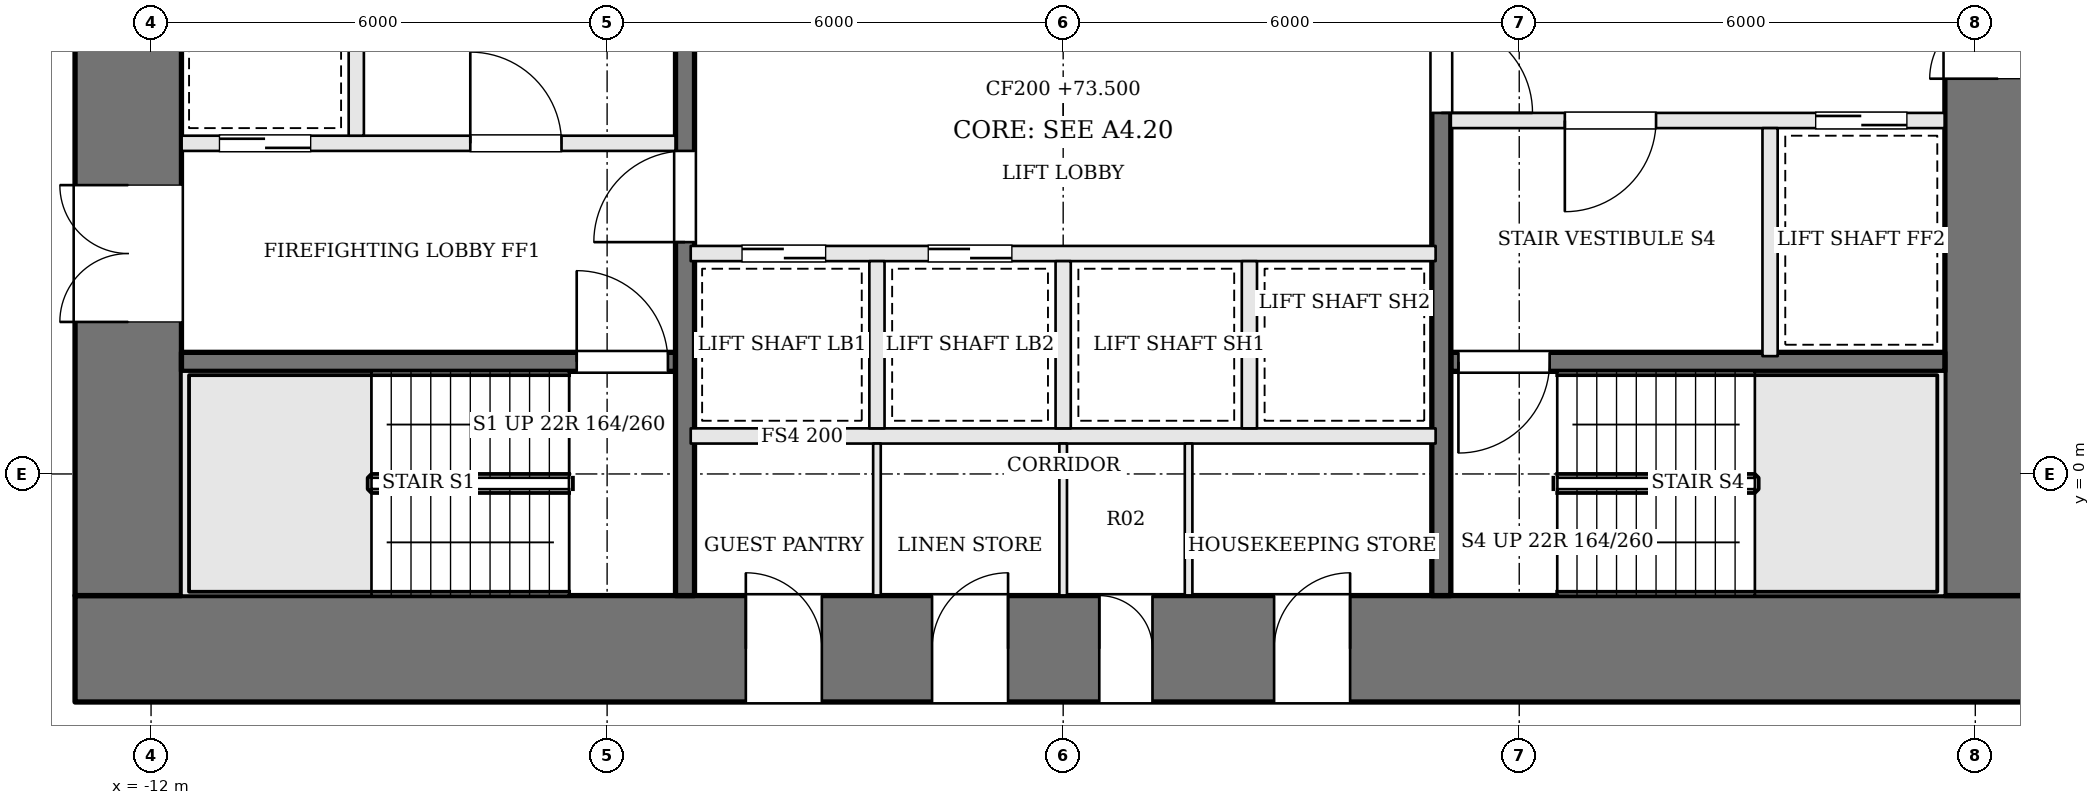
"""IFC4 building model, lengths in metres.
Left out: names, types, materials, properties, quantities, classifications, styles, units other than length and angle.
Written with IfcOpenShell. Run it as: python <this file> out.ifc"""

import sys

from ifc_helpers import new_model, si_unit, direction, frame, frame_2d, origin, place, context, subcontext, project, spatial, rectangle, extrude, element, fill, save


model = new_model("IFC4")
c1 = context("Model", 3, precision=1e-05, world=origin(), true_north=direction((0.0, 1.0)))
c2 = subcontext(c1, "Body", "Model", "MODEL_VIEW")
j1 = project(units=[si_unit("LENGTHUNIT", "METRE"), si_unit("PLANEANGLEUNIT", "RADIAN")], contexts=[c1])
p1 = place(None, origin())
s1 = spatial("IfcSite", under=j1, at=p1, CompositionType="ELEMENT")
p2 = place(p1, origin())
s2 = spatial("IfcBuilding", under=s1, at=p2, CompositionType="ELEMENT")
p3 = place(p2, frame((0.0, 0.0, 73.5)))
s3 = spatial("IfcBuildingStorey", under=s2, at=p3, CompositionType="ELEMENT", Elevation=73.5)
p4 = place(p3, frame((-13.0, -2.3, 0.0), z_axis=(0.0, 0.0, 1.0), x_axis=(1.0, 0.0, 0.0)))
e1 = element("IfcWall", 1, at=p4, inside=s3, PredefinedType="SHEAR", context=c2, shape_type="SweptSolid", body=[
    extrude(rectangle(XDim=26.0, YDim=1.4, at=frame_2d((13.0, 0.0))), origin(), (0.0, 0.0, 1.0), 3.6),
])
p5 = place(p4, frame((8.825, 0.0, 0.0)))
e2 = element("IfcOpeningElement", 2, at=p5, cuts=e1, PredefinedType="OPENING", context=c2, shape_type="SweptSolid", body=[
    extrude(rectangle(XDim=1.0, YDim=2.1, at=frame_2d((0.5, 1.05))), frame((0.0, 0.71, 0.0), z_axis=(0.0, -1.0, 0.0), x_axis=(1.0, 0.0, 0.0)), (0.0, 0.0, 1.0), 1.42),
])
p6 = place(p4, frame((11.275, 0.0, 0.0)))
e3 = element("IfcOpeningElement", 3, at=p6, cuts=e1, PredefinedType="OPENING", context=c2, shape_type="SweptSolid", body=[
    extrude(rectangle(XDim=1.0, YDim=2.1, at=frame_2d((0.5, 1.05))), frame((0.0, 0.71, 0.0), z_axis=(0.0, -1.0, 0.0), x_axis=(1.0, 0.0, 0.0)), (0.0, 0.0, 1.0), 1.42),
])
p7 = place(p4, frame((13.475, 0.0, 0.0)))
e4 = element("IfcOpeningElement", 4, at=p7, cuts=e1, PredefinedType="OPENING", context=c2, shape_type="SweptSolid", body=[
    extrude(rectangle(XDim=0.7, YDim=2.1, at=frame_2d((0.35, 1.05))), frame((0.0, 0.71, 0.0), z_axis=(0.0, -1.0, 0.0), x_axis=(1.0, 0.0, 0.0)), (0.0, 0.0, 1.0), 1.42),
])
p8 = place(p4, frame((15.775, 0.0, 0.0)))
e5 = element("IfcOpeningElement", 5, at=p8, cuts=e1, PredefinedType="OPENING", context=c2, shape_type="SweptSolid", body=[
    extrude(rectangle(XDim=1.0, YDim=2.1, at=frame_2d((0.5, 1.05))), frame((0.0, 0.71, 0.0), z_axis=(0.0, -1.0, 0.0), x_axis=(1.0, 0.0, 0.0)), (0.0, 0.0, 1.0), 1.42),
])
p9 = place(p3, frame((12.3, -1.6, 0.0), z_axis=(0.0, 0.0, 1.0), x_axis=(0.0, 1.0, 0.0)))
e6 = element("IfcWall", 6, at=p9, inside=s3, PredefinedType="SHEAR", context=c2, shape_type="SweptSolid", body=[
    extrude(rectangle(XDim=12.2, YDim=1.4, at=frame_2d((6.1, 0.0))), origin(), (0.0, 0.0, 1.0), 3.6),
])
p10 = place(p9, frame((6.8, 0.0, 0.0)))
e7 = element("IfcOpeningElement", 7, at=p10, cuts=e6, PredefinedType="OPENING", context=c2, shape_type="SweptSolid", body=[
    extrude(rectangle(XDim=1.8, YDim=2.1, at=frame_2d((0.9, 1.05))), frame((0.0, 0.71, 0.0), z_axis=(0.0, -1.0, 0.0), x_axis=(1.0, 0.0, 0.0)), (0.0, 0.0, 1.0), 1.42),
])
p11 = place(p3, frame((-12.3, -1.6, 0.0), z_axis=(0.0, 0.0, 1.0), x_axis=(0.0, 1.0, 0.0)))
e8 = element("IfcWall", 8, at=p11, inside=s3, PredefinedType="SHEAR", context=c2, shape_type="SweptSolid", body=[
    extrude(rectangle(XDim=12.2, YDim=1.4, at=frame_2d((6.1, 0.0))), origin(), (0.0, 0.0, 1.0), 3.6),
])
p12 = place(p11, frame((3.6, 0.0, 0.0)))
e9 = element("IfcOpeningElement", 9, at=p12, cuts=e8, PredefinedType="OPENING", context=c2, shape_type="SweptSolid", body=[
    extrude(rectangle(XDim=1.8, YDim=2.1, at=frame_2d((0.9, 1.05))), frame((0.0, 0.71, 0.0), z_axis=(0.0, -1.0, 0.0), x_axis=(1.0, 0.0, 0.0)), (0.0, 0.0, 1.0), 1.42),
])
p13 = place(p3, frame((-11.6, 1.475, 0.0), z_axis=(0.0, 0.0, 1.0), x_axis=(1.0, 0.0, 0.0)))
e10 = element("IfcWall", 10, at=p13, inside=s3, PredefinedType="SOLIDWALL", context=c2, shape_type="SweptSolid", body=[
    extrude(rectangle(XDim=6.5, YDim=0.25, at=frame_2d((3.25, 0.0))), origin(), (0.0, 0.0, 1.0), 3.3),
])
p14 = place(p13, frame((5.2, 0.0, 0.0)))
e11 = element("IfcOpeningElement", 11, at=p14, cuts=e10, PredefinedType="OPENING", context=c2, shape_type="SweptSolid", body=[
    extrude(rectangle(XDim=1.2, YDim=2.1, at=frame_2d((0.6, 1.05))), frame((0.0, 0.135, 0.0), z_axis=(0.0, -1.0, 0.0), x_axis=(1.0, 0.0, 0.0)), (0.0, 0.0, 1.0), 0.27),
])
p15 = place(p3, frame((-11.6, 4.35, 0.0), z_axis=(0.0, 0.0, 1.0), x_axis=(1.0, 0.0, 0.0)))
e12 = element("IfcWall", 12, at=p15, inside=s3, PredefinedType="SOLIDWALL", context=c2, shape_type="SweptSolid", body=[
    extrude(rectangle(XDim=6.5, YDim=0.2, at=frame_2d((3.25, 0.0))), origin(), (0.0, 0.0, 1.0), 3.3),
])
p16 = place(p15, frame((3.8, 0.0, 0.0)))
e13 = element("IfcOpeningElement", 13, at=p16, cuts=e12, PredefinedType="OPENING", context=c2, shape_type="SweptSolid", body=[
    extrude(rectangle(XDim=1.2, YDim=2.1, at=frame_2d((0.6, 1.05))), frame((0.0, 0.11, 0.0), z_axis=(0.0, -1.0, 0.0), x_axis=(1.0, 0.0, 0.0)), (0.0, 0.0, 1.0), 0.22),
])
p17 = place(p15, frame((0.5, 0.0, 0.0)))
e14 = element("IfcOpeningElement", 14, at=p17, cuts=e12, PredefinedType="OPENING", context=c2, shape_type="SweptSolid", body=[
    extrude(rectangle(XDim=1.2, YDim=2.1, at=frame_2d((0.6, 1.05))), frame((0.0, 0.11, 0.0), z_axis=(0.0, -1.0, 0.0), x_axis=(1.0, 0.0, 0.0)), (0.0, 0.0, 1.0), 0.22),
])
p18 = place(p3, frame((11.6, 4.65, 0.0), z_axis=(0.0, 0.0, 1.0), x_axis=(-1.0, 0.0, 0.0)))
e15 = element("IfcWall", 15, at=p18, inside=s3, PredefinedType="SOLIDWALL", context=c2, shape_type="SweptSolid", body=[
    extrude(rectangle(XDim=6.5, YDim=0.2, at=frame_2d((3.25, 0.0))), origin(), (0.0, 0.0, 1.0), 3.3),
])
p19 = place(p18, frame((3.8, 0.0, 0.0)))
e16 = element("IfcOpeningElement", 16, at=p19, cuts=e15, PredefinedType="OPENING", context=c2, shape_type="SweptSolid", body=[
    extrude(rectangle(XDim=1.2, YDim=2.1, at=frame_2d((0.6, 1.05))), frame((0.0, 0.11, 0.0), z_axis=(0.0, -1.0, 0.0), x_axis=(1.0, 0.0, 0.0)), (0.0, 0.0, 1.0), 0.22),
])
p20 = place(p18, frame((0.5, 0.0, 0.0)))
e17 = element("IfcOpeningElement", 17, at=p20, cuts=e15, PredefinedType="OPENING", context=c2, shape_type="SweptSolid", body=[
    extrude(rectangle(XDim=1.2, YDim=2.1, at=frame_2d((0.6, 1.05))), frame((0.0, 0.11, 0.0), z_axis=(0.0, -1.0, 0.0), x_axis=(1.0, 0.0, 0.0)), (0.0, 0.0, 1.0), 0.22),
])
p21 = place(p3, frame((11.6, 1.475, 0.0), z_axis=(0.0, 0.0, 1.0), x_axis=(-1.0, 0.0, 0.0)))
e18 = element("IfcWall", 18, at=p21, inside=s3, PredefinedType="SOLIDWALL", context=c2, shape_type="SweptSolid", body=[
    extrude(rectangle(XDim=6.5, YDim=0.25, at=frame_2d((3.25, 0.0))), origin(), (0.0, 0.0, 1.0), 3.3),
])
p22 = place(p21, frame((5.2, 0.0, 0.0)))
e19 = element("IfcOpeningElement", 19, at=p22, cuts=e18, PredefinedType="OPENING", context=c2, shape_type="SweptSolid", body=[
    extrude(rectangle(XDim=1.2, YDim=2.1, at=frame_2d((0.6, 1.05))), frame((0.0, 0.135, 0.0), z_axis=(0.0, -1.0, 0.0), x_axis=(1.0, 0.0, 0.0)), (0.0, 0.0, 1.0), 0.27),
])
for number, where, z_axis, x_axis in (
    (20, (-9.3, 4.45, 0.0), (0.0, 0.0, 1.0), (0.0, 1.0, 0.0)),
    (21, (9.3, 4.55, 0.0), (0.0, 0.0, 1.0), (0.0, -1.0, 0.0)),
):
    element("IfcWall", number, at=place(p3, frame(where, z_axis=z_axis, x_axis=x_axis)), inside=s3, PredefinedType="SOLIDWALL", context=c2, shape_type="SweptSolid", body=[
        extrude(rectangle(XDim=3.0, YDim=0.2, at=frame_2d((1.5, 0.0))), origin(), (0.0, 0.0, 1.0), 3.3),
    ])
p23 = place(p3, frame((-4.975, -1.6, 0.0), z_axis=(0.0, 0.0, 1.0), x_axis=(0.0, 1.0, 0.0)))
e22 = element("IfcWall", 22, at=p23, inside=s3, PredefinedType="SOLIDWALL", context=c2, shape_type="SweptSolid", body=[
    extrude(rectangle(XDim=12.2, YDim=0.25, at=frame_2d((6.1, 0.0))), origin(), (0.0, 0.0, 1.0), 3.3),
])
p24 = place(p23, frame((4.65, 0.0, 0.0)))
e23 = element("IfcOpeningElement", 23, at=p24, cuts=e22, PredefinedType="OPENING", context=c2, shape_type="SweptSolid", body=[
    extrude(rectangle(XDim=1.2, YDim=2.1, at=frame_2d((0.6, 1.05))), frame((0.0, 0.135, 0.0), z_axis=(0.0, -1.0, 0.0), x_axis=(1.0, 0.0, 0.0)), (0.0, 0.0, 1.0), 0.27),
])
p25 = place(p3, frame((4.975, 10.6, 0.0), z_axis=(0.0, 0.0, 1.0), x_axis=(0.0, -1.0, 0.0)))
e24 = element("IfcWall", 24, at=p25, inside=s3, PredefinedType="SOLIDWALL", context=c2, shape_type="SweptSolid", body=[
    extrude(rectangle(XDim=12.2, YDim=0.25, at=frame_2d((6.1, 0.0))), origin(), (0.0, 0.0, 1.0), 3.3),
])
p26 = place(p25, frame((4.65, 0.0, 0.0)))
e25 = element("IfcOpeningElement", 25, at=p26, cuts=e24, PredefinedType="OPENING", context=c2, shape_type="SweptSolid", body=[
    extrude(rectangle(XDim=1.2, YDim=2.1, at=frame_2d((0.6, 1.05))), frame((0.0, 0.135, 0.0), z_axis=(0.0, -1.0, 0.0), x_axis=(1.0, 0.0, 0.0)), (0.0, 0.0, 1.0), 0.27),
])
p27 = place(p3, frame((-4.9, 0.5, 0.0), z_axis=(0.0, 0.0, 1.0), x_axis=(1.0, 0.0, 0.0)))
e26 = element("IfcWall", 26, at=p27, inside=s3, PredefinedType="SOLIDWALL", context=c2, shape_type="SweptSolid", body=[
    extrude(rectangle(XDim=9.8, YDim=0.2, at=frame_2d((4.9, 0.0))), origin(), (0.0, 0.0, 1.0), 3.3),
])
p28 = place(p3, frame((-4.9, 2.9, 0.0), z_axis=(0.0, 0.0, 1.0), x_axis=(1.0, 0.0, 0.0)))
e27 = element("IfcWall", 27, at=p28, inside=s3, PredefinedType="SOLIDWALL", context=c2, shape_type="SweptSolid", body=[
    extrude(rectangle(XDim=9.8, YDim=0.2, at=frame_2d((4.9, 0.0))), origin(), (0.0, 0.0, 1.0), 3.3),
])
p29 = place(p28, frame((0.675, 0.0, 0.0)))
e28 = element("IfcOpeningElement", 28, at=p29, cuts=e27, PredefinedType="OPENING", context=c2, shape_type="SweptSolid", body=[
    extrude(rectangle(XDim=1.1, YDim=2.1, at=frame_2d((0.55, 1.05))), frame((0.0, 0.11, 0.0), z_axis=(0.0, -1.0, 0.0), x_axis=(1.0, 0.0, 0.0)), (0.0, 0.0, 1.0), 0.22),
])
p30 = place(p28, frame((3.125, 0.0, 0.0)))
e29 = element("IfcOpeningElement", 29, at=p30, cuts=e27, PredefinedType="OPENING", context=c2, shape_type="SweptSolid", body=[
    extrude(rectangle(XDim=1.1, YDim=2.1, at=frame_2d((0.55, 1.05))), frame((0.0, 0.11, 0.0), z_axis=(0.0, -1.0, 0.0), x_axis=(1.0, 0.0, 0.0)), (0.0, 0.0, 1.0), 0.22),
])
for number, where, z_axis, x_axis in (
    (30, (-2.45, 0.6, 0.0), (0.0, 0.0, 1.0), (0.0, 1.0, 0.0)),
    (31, (0.0, 0.6, 0.0), (0.0, 0.0, 1.0), (0.0, 1.0, 0.0)),
    (32, (2.45, 0.6, 0.0), (0.0, 0.0, 1.0), (0.0, 1.0, 0.0)),
):
    element("IfcWall", number, at=place(p3, frame(where, z_axis=z_axis, x_axis=x_axis)), inside=s3, PredefinedType="SOLIDWALL", context=c2, shape_type="SweptSolid", body=[
        extrude(rectangle(XDim=2.2, YDim=0.2, at=frame_2d((1.1, 0.0))), origin(), (0.0, 0.0, 1.0), 3.3),
    ])
for number, where, z_axis, x_axis in (
    (33, (-2.45, -1.6, 0.0), (0.0, 0.0, 1.0), (0.0, 1.0, 0.0)),
    (34, (0.0, -1.6, 0.0), (0.0, 0.0, 1.0), (0.0, 1.0, 0.0)),
    (35, (1.65, -1.6, 0.0), (0.0, 0.0, 1.0), (0.0, 1.0, 0.0)),
):
    element("IfcWall", number, at=place(p3, frame(where, z_axis=z_axis, x_axis=x_axis)), inside=s3, PredefinedType="PARTITIONING", context=c2, shape_type="SweptSolid", body=[
        extrude(rectangle(XDim=2.0, YDim=0.1, at=frame_2d((1.0, 0.0))), origin(), (0.0, 0.0, 1.0), 3.3),
    ])
p31 = place(p12, origin())
e36 = element("IfcDoor", 36, at=p31, inside=s3, OperationType="DOUBLE_DOOR_SINGLE_SWING", PredefinedType="DOOR", context=c2, shape_type="SweptSolid", body=[
    extrude(rectangle(XDim=1.8, YDim=2.1, at=frame_2d((0.9, 1.05))), frame((0.0, 0.025, 0.0), z_axis=(0.0, -1.0, 0.0), x_axis=(1.0, 0.0, 0.0)), (0.0, 0.0, 1.0), 0.05),
])
fill(e9, e36)
p32 = place(p10, origin())
e37 = element("IfcDoor", 37, at=p32, inside=s3, OperationType="DOUBLE_DOOR_SINGLE_SWING", PredefinedType="DOOR", context=c2, shape_type="SweptSolid", body=[
    extrude(rectangle(XDim=1.8, YDim=2.1, at=frame_2d((0.9, 1.05))), frame((0.0, 0.025, 0.0), z_axis=(0.0, -1.0, 0.0), x_axis=(1.0, 0.0, 0.0)), (0.0, 0.0, 1.0), 0.05),
])
fill(e7, e37)
p33 = place(p24, origin())
e38 = element("IfcDoor", 38, at=p33, inside=s3, OperationType="SINGLE_SWING_LEFT", PredefinedType="DOOR", context=c2, shape_type="SweptSolid", body=[
    extrude(rectangle(XDim=1.2, YDim=2.1, at=frame_2d((0.6, 1.05))), frame((0.0, 0.025, 0.0), z_axis=(0.0, -1.0, 0.0), x_axis=(1.0, 0.0, 0.0)), (0.0, 0.0, 1.0), 0.05),
])
fill(e23, e38)
p34 = place(p26, origin())
e39 = element("IfcDoor", 39, at=p34, inside=s3, OperationType="SINGLE_SWING_RIGHT", PredefinedType="DOOR", context=c2, shape_type="SweptSolid", body=[
    extrude(rectangle(XDim=1.2, YDim=2.1, at=frame_2d((0.6, 1.05))), frame((0.0, 0.025, 0.0), z_axis=(0.0, -1.0, 0.0), x_axis=(1.0, 0.0, 0.0)), (0.0, 0.0, 1.0), 0.05),
])
fill(e25, e39)
p35 = place(p16, origin())
e40 = element("IfcDoor", 40, at=p35, inside=s3, OperationType="SINGLE_SWING_LEFT", PredefinedType="DOOR", context=c2, shape_type="SweptSolid", body=[
    extrude(rectangle(XDim=1.2, YDim=2.1, at=frame_2d((0.6, 1.05))), frame((0.0, 0.025, 0.0), z_axis=(0.0, -1.0, 0.0), x_axis=(1.0, 0.0, 0.0)), (0.0, 0.0, 1.0), 0.05),
])
fill(e13, e40)
p36 = place(p19, origin())
e41 = element("IfcDoor", 41, at=p36, inside=s3, OperationType="SINGLE_SWING_RIGHT", PredefinedType="DOOR", context=c2, shape_type="SweptSolid", body=[
    extrude(rectangle(XDim=1.2, YDim=2.1, at=frame_2d((0.6, 1.05))), frame((0.0, 0.025, 0.0), z_axis=(0.0, -1.0, 0.0), x_axis=(1.0, 0.0, 0.0)), (0.0, 0.0, 1.0), 0.05),
])
fill(e16, e41)
p37 = place(p14, origin())
e42 = element("IfcDoor", 42, at=p37, inside=s3, OperationType="SINGLE_SWING_LEFT", PredefinedType="DOOR", context=c2, shape_type="SweptSolid", body=[
    extrude(rectangle(XDim=1.2, YDim=2.1, at=frame_2d((0.6, 1.05))), frame((0.0, 0.025, 0.0), z_axis=(0.0, -1.0, 0.0), x_axis=(1.0, 0.0, 0.0)), (0.0, 0.0, 1.0), 0.05),
])
fill(e11, e42)
p38 = place(p22, origin())
e43 = element("IfcDoor", 43, at=p38, inside=s3, OperationType="SINGLE_SWING_RIGHT", PredefinedType="DOOR", context=c2, shape_type="SweptSolid", body=[
    extrude(rectangle(XDim=1.2, YDim=2.1, at=frame_2d((0.6, 1.05))), frame((0.0, 0.025, 0.0), z_axis=(0.0, -1.0, 0.0), x_axis=(1.0, 0.0, 0.0)), (0.0, 0.0, 1.0), 0.05),
])
fill(e19, e43)
p39 = place(p17, origin())
e44 = element("IfcDoor", 44, at=p39, inside=s3, OperationType="SLIDING_TO_RIGHT", PredefinedType="DOOR", context=c2, shape_type="SweptSolid", body=[
    extrude(rectangle(XDim=1.2, YDim=2.1, at=frame_2d((0.6, 1.05))), frame((0.0, 0.025, 0.0), z_axis=(0.0, -1.0, 0.0), x_axis=(1.0, 0.0, 0.0)), (0.0, 0.0, 1.0), 0.05),
])
fill(e14, e44)
p40 = place(p20, origin())
e45 = element("IfcDoor", 45, at=p40, inside=s3, OperationType="SLIDING_TO_RIGHT", PredefinedType="DOOR", context=c2, shape_type="SweptSolid", body=[
    extrude(rectangle(XDim=1.2, YDim=2.1, at=frame_2d((0.6, 1.05))), frame((0.0, 0.025, 0.0), z_axis=(0.0, -1.0, 0.0), x_axis=(1.0, 0.0, 0.0)), (0.0, 0.0, 1.0), 0.05),
])
fill(e17, e45)
p41 = place(p29, origin())
e46 = element("IfcDoor", 46, at=p41, inside=s3, OperationType="SLIDING_TO_RIGHT", PredefinedType="DOOR", context=c2, shape_type="SweptSolid", body=[
    extrude(rectangle(XDim=1.1, YDim=2.1, at=frame_2d((0.55, 1.05))), frame((0.0, 0.025, 0.0), z_axis=(0.0, -1.0, 0.0), x_axis=(1.0, 0.0, 0.0)), (0.0, 0.0, 1.0), 0.05),
])
fill(e28, e46)
p42 = place(p30, origin())
e47 = element("IfcDoor", 47, at=p42, inside=s3, OperationType="SLIDING_TO_LEFT", PredefinedType="DOOR", context=c2, shape_type="SweptSolid", body=[
    extrude(rectangle(XDim=1.1, YDim=2.1, at=frame_2d((0.55, 1.05))), frame((0.0, 0.025, 0.0), z_axis=(0.0, -1.0, 0.0), x_axis=(1.0, 0.0, 0.0)), (0.0, 0.0, 1.0), 0.05),
])
fill(e29, e47)
p43 = place(p5, origin())
e48 = element("IfcDoor", 48, at=p43, inside=s3, OperationType="SINGLE_SWING_LEFT", PredefinedType="DOOR", context=c2, shape_type="SweptSolid", body=[
    extrude(rectangle(XDim=1.0, YDim=2.1, at=frame_2d((0.5, 1.05))), frame((0.0, 0.025, 0.0), z_axis=(0.0, -1.0, 0.0), x_axis=(1.0, 0.0, 0.0)), (0.0, 0.0, 1.0), 0.05),
])
fill(e2, e48)
p44 = place(p6, origin())
e49 = element("IfcDoor", 49, at=p44, inside=s3, OperationType="SINGLE_SWING_RIGHT", PredefinedType="DOOR", context=c2, shape_type="SweptSolid", body=[
    extrude(rectangle(XDim=1.0, YDim=2.1, at=frame_2d((0.5, 1.05))), frame((0.0, 0.025, 0.0), z_axis=(0.0, -1.0, 0.0), x_axis=(1.0, 0.0, 0.0)), (0.0, 0.0, 1.0), 0.05),
])
fill(e3, e49)
p45 = place(p7, origin())
e50 = element("IfcDoor", 50, at=p45, inside=s3, OperationType="SINGLE_SWING_LEFT", PredefinedType="DOOR", context=c2, shape_type="SweptSolid", body=[
    extrude(rectangle(XDim=0.7, YDim=2.1, at=frame_2d((0.35, 1.05))), frame((0.0, 0.025, 0.0), z_axis=(0.0, -1.0, 0.0), x_axis=(1.0, 0.0, 0.0)), (0.0, 0.0, 1.0), 0.05),
])
fill(e4, e50)
p46 = place(p8, origin())
e51 = element("IfcDoor", 51, at=p46, inside=s3, OperationType="SINGLE_SWING_RIGHT", PredefinedType="DOOR", context=c2, shape_type="SweptSolid", body=[
    extrude(rectangle(XDim=1.0, YDim=2.1, at=frame_2d((0.5, 1.05))), frame((0.0, 0.025, 0.0), z_axis=(0.0, -1.0, 0.0), x_axis=(1.0, 0.0, 0.0)), (0.0, 0.0, 1.0), 0.05),
])
fill(e5, e51)
save(model, sys.argv[1])
